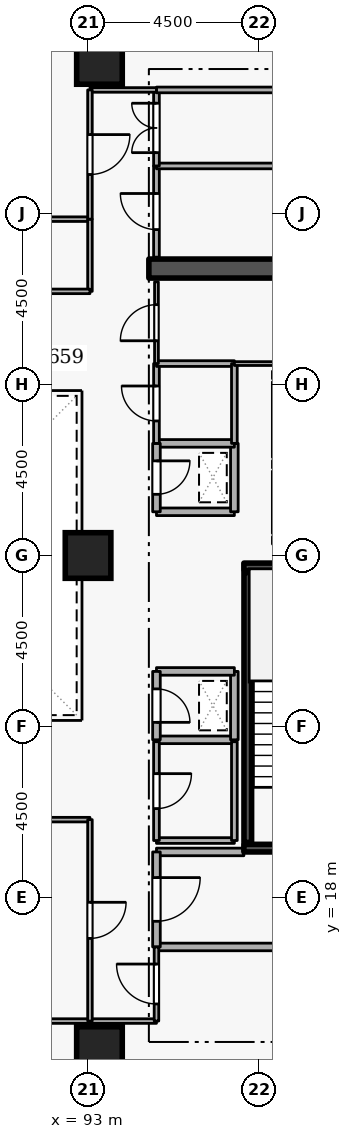
"""IFC4 building model, lengths in metres.
Left out: names, types, materials, properties, quantities, classifications, styles, units other than length and angle.
Written with IfcOpenShell. Run it as: python <this file> out.ifc"""

import sys

from ifc_helpers import new_model, si_unit, direction, frame, frame_2d, origin, origin_2d, place, context, subcontext, project, spatial, rectangle, extrude, element, fill, save


model = new_model("IFC4")
c1 = context("Model", 3, precision=1e-05, world=origin(), true_north=direction((0.0, 1.0)))
c2 = subcontext(c1, "Body", "Model", "MODEL_VIEW")
j1 = project(units=[si_unit("LENGTHUNIT", "METRE"), si_unit("PLANEANGLEUNIT", "RADIAN")], contexts=[c1])
p1 = place(None, origin())
s1 = spatial("IfcSite", under=j1, at=p1, CompositionType="ELEMENT")
p2 = place(p1, origin())
s2 = spatial("IfcBuilding", under=s1, at=p2, CompositionType="ELEMENT")
p3 = place(p2, frame((0.0, 0.0, 137.7)))
s3 = spatial("IfcBuildingStorey", under=s2, at=p3, CompositionType="ELEMENT", Elevation=137.7)
p4 = place(p3, frame((94.6, 34.55, 0.0), z_axis=(0.0, 0.0, 1.0), x_axis=(1.0, 0.0, 0.0)))
e1 = element("IfcWall", 1, at=p4, inside=s3, PredefinedType="SHEAR", context=c2, shape_type="SweptSolid", body=[
    extrude(rectangle(XDim=5.8, YDim=0.5, at=frame_2d((2.9, 0.0))), origin(), (0.0, 0.0, 1.0), 3.6),
])
for number, where, z_axis, x_axis in (
    (2, (93.3, 14.0, 0.0), (0.0, 0.0, 1.0), (1.0, 0.0, 0.0)),
    (3, (93.3, 40.0, 0.0), (0.0, 0.0, 1.0), (1.0, 0.0, 0.0)),
    (4, (93.0, 27.0, 0.0), (0.0, 0.0, 1.0), (1.0, 0.0, 0.0)),
):
    element("IfcColumn", number, at=place(p3, frame(where, z_axis=z_axis, x_axis=x_axis)), inside=s3, PredefinedType="COLUMN", context=c2, shape_type="SweptSolid", body=[
        extrude(rectangle(XDim=1.2, YDim=1.2, at=origin_2d()), origin(), (0.0, 0.0, 1.0), 3.6),
    ])
p5 = place(p3, frame((97.95, 29.22, 0.0), z_axis=(0.0, 0.0, 1.0), x_axis=(0.0, -1.0, 0.0)))
e5 = element("IfcWall", 5, at=p5, inside=s3, PredefinedType="STANDARD", context=c2, shape_type="SweptSolid", body=[
    extrude(rectangle(XDim=1.64, YDim=0.2, at=frame_2d((0.82, 0.0))), origin(), (0.0, 0.0, 1.0), 3.26),
])
p6 = place(p5, frame((0.31, 0.0, 0.0)))
e6 = element("IfcOpeningElement", 6, at=p6, cuts=e5, PredefinedType="OPENING", context=c2, shape_type="SweptSolid", body=[
    extrude(rectangle(XDim=1.02, YDim=2.06, at=frame_2d((0.51, 1.03))), frame((0.0, 0.11, 0.0), z_axis=(0.0, -1.0, 0.0), x_axis=(1.0, 0.0, 0.0)), (0.0, 0.0, 1.0), 0.22),
])
p7 = place(p3, frame((97.95, 31.57, 0.0), z_axis=(0.0, 0.0, 1.0), x_axis=(0.0, -1.0, 0.0)))
e7 = element("IfcWall", 7, at=p7, inside=s3, PredefinedType="STANDARD", context=c2, shape_type="SweptSolid", body=[
    extrude(rectangle(XDim=1.99, YDim=0.2, at=frame_2d((0.995, 0.0))), origin(), (0.0, 0.0, 1.0), 3.26),
])
p8 = place(p3, frame((100.45, 19.3, 0.0), z_axis=(0.0, 0.0, 1.0), x_axis=(-1.0, 0.0, 0.0)))
e8 = element("IfcWall", 8, at=p8, inside=s3, PredefinedType="SHEAR", context=c2, shape_type="SweptSolid", body=[
    extrude(rectangle(XDim=3.35, YDim=0.2, at=frame_2d((1.675, 0.0))), origin(), (0.0, 0.0, 1.0), 3.6),
])
p9 = place(p8, frame((1.125, 0.0, 0.0)))
e9 = element("IfcOpeningElement", 9, at=p9, cuts=e8, PredefinedType="OPENING", context=c2, shape_type="SweptSolid", body=[
    extrude(rectangle(XDim=1.1, YDim=2.1, at=frame_2d((0.55, 1.05))), frame((0.0, 0.11, 0.0), z_axis=(0.0, -1.0, 0.0), x_axis=(1.0, 0.0, 0.0)), (0.0, 0.0, 1.0), 0.22),
])
p10 = place(p3, frame((97.1, 26.7, 0.0), z_axis=(0.0, 0.0, 1.0), x_axis=(1.0, 0.0, 0.0)))
e10 = element("IfcWall", 10, at=p10, inside=s3, PredefinedType="SHEAR", context=c2, shape_type="SweptSolid", body=[
    extrude(rectangle(XDim=3.35, YDim=0.2, at=frame_2d((1.675, 0.0))), origin(), (0.0, 0.0, 1.0), 3.6),
])
p11 = place(p3, frame((97.203, 26.55, 0.0), z_axis=(0.0, 0.0, 1.0), x_axis=(0.0, -1.0, 0.0)))
e11 = element("IfcWall", 11, at=p11, inside=s3, PredefinedType="SHEAR", context=c2, shape_type="SweptSolid", body=[
    extrude(rectangle(XDim=7.1, YDim=0.2, at=frame_2d((3.55, 0.0))), origin(), (0.0, 0.0, 1.0), 3.6),
])
p12 = place(p3, frame((94.8, 16.7, 0.0), z_axis=(0.0, 0.0, 1.0), x_axis=(1.0, 0.0, 0.0)))
e12 = element("IfcWall", 12, at=p12, inside=s3, PredefinedType="STANDARD", context=c2, shape_type="SweptSolid", body=[
    extrude(rectangle(XDim=5.7, YDim=0.2, at=frame_2d((2.85, 0.0))), origin(), (0.0, 0.0, 1.0), 3.26),
])
p13 = place(p3, frame((97.1, 19.2, 0.0), z_axis=(0.0, 0.0, 1.0), x_axis=(-1.0, 0.0, 0.0)))
e13 = element("IfcWall", 13, at=p13, inside=s3, PredefinedType="STANDARD", context=c2, shape_type="SweptSolid", body=[
    extrude(rectangle(XDim=2.3, YDim=0.2, at=frame_2d((1.15, 0.0))), origin(), (0.0, 0.0, 1.0), 2.465),
])
p14 = place(p3, frame((94.8, 19.2, 0.0), z_axis=(0.0, 0.0, 1.0), x_axis=(0.0, -1.0, 0.0)))
e14 = element("IfcWall", 14, at=p14, inside=s3, PredefinedType="STANDARD", context=c2, shape_type="SweptSolid", body=[
    extrude(rectangle(XDim=2.5, YDim=0.2, at=frame_2d((1.25, 0.0))), origin(), (0.0, 0.0, 1.0), 3.26),
])
p15 = place(p14, frame((0.675, 0.0, 0.0)))
e15 = element("IfcOpeningElement", 15, at=p15, cuts=e14, PredefinedType="OPENING", context=c2, shape_type="SweptSolid", body=[
    extrude(rectangle(XDim=1.15, YDim=2.1, at=frame_2d((0.575, 1.05))), frame((0.0, 0.11, 0.0), z_axis=(0.0, -1.0, 0.0), x_axis=(1.0, 0.0, 0.0)), (0.0, 0.0, 1.0), 0.22),
])
p16 = place(p3, frame((94.8, 28.15, 0.0), z_axis=(0.0, 0.0, 1.0), x_axis=(1.0, 0.0, 0.0)))
e16 = element("IfcWall", 16, at=p16, inside=s3, PredefinedType="STANDARD", context=c2, shape_type="SweptSolid", body=[
    extrude(rectangle(XDim=2.05, YDim=0.2, at=frame_2d((1.025, 0.0))), origin(), (0.0, 0.0, 1.0), 3.26),
])
p17 = place(p3, frame((96.85, 28.15, 0.0), z_axis=(0.0, 0.0, 1.0), x_axis=(0.0, 1.0, 0.0)))
e17 = element("IfcWall", 17, at=p17, inside=s3, PredefinedType="STANDARD", context=c2, shape_type="SweptSolid", body=[
    extrude(rectangle(XDim=1.8, YDim=0.2, at=frame_2d((0.9, 0.0))), origin(), (0.0, 0.0, 1.0), 3.26),
])
p18 = place(p3, frame((96.85, 29.95, 0.0), z_axis=(0.0, 0.0, 1.0), x_axis=(-1.0, 0.0, 0.0)))
e18 = element("IfcWall", 18, at=p18, inside=s3, PredefinedType="STANDARD", context=c2, shape_type="SweptSolid", body=[
    extrude(rectangle(XDim=2.05, YDim=0.2, at=frame_2d((1.025, 0.0))), origin(), (0.0, 0.0, 1.0), 3.26),
])
p19 = place(p3, frame((94.8, 29.95, 0.0), z_axis=(0.0, 0.0, 1.0), x_axis=(0.0, -1.0, 0.0)))
e19 = element("IfcWall", 19, at=p19, inside=s3, PredefinedType="STANDARD", context=c2, shape_type="SweptSolid", body=[
    extrude(rectangle(XDim=1.8, YDim=0.2, at=frame_2d((0.9, 0.0))), origin(), (0.0, 0.0, 1.0), 3.26),
])
p20 = place(p19, frame((0.46, 0.0, 0.0)))
e20 = element("IfcOpeningElement", 20, at=p20, cuts=e19, PredefinedType="OPENING", context=c2, shape_type="SweptSolid", body=[
    extrude(rectangle(XDim=0.88, YDim=2.04, at=frame_2d((0.44, 1.02))), frame((0.0, 0.11, 0.0), z_axis=(0.0, -1.0, 0.0), x_axis=(1.0, 0.0, 0.0)), (0.0, 0.0, 1.0), 0.22),
])
p21 = place(p3, frame((94.8, 22.15, 0.0), z_axis=(0.0, 0.0, 1.0), x_axis=(1.0, 0.0, 0.0)))
e21 = element("IfcWall", 21, at=p21, inside=s3, PredefinedType="STANDARD", context=c2, shape_type="SweptSolid", body=[
    extrude(rectangle(XDim=2.05, YDim=0.2, at=frame_2d((1.025, 0.0))), origin(), (0.0, 0.0, 1.0), 3.26),
])
p22 = place(p3, frame((96.85, 22.15, 0.0), z_axis=(0.0, 0.0, 1.0), x_axis=(0.0, 1.0, 0.0)))
e22 = element("IfcWall", 22, at=p22, inside=s3, PredefinedType="STANDARD", context=c2, shape_type="SweptSolid", body=[
    extrude(rectangle(XDim=1.8, YDim=0.2, at=frame_2d((0.9, 0.0))), origin(), (0.0, 0.0, 1.0), 3.26),
])
p23 = place(p3, frame((96.85, 23.95, 0.0), z_axis=(0.0, 0.0, 1.0), x_axis=(-1.0, 0.0, 0.0)))
e23 = element("IfcWall", 23, at=p23, inside=s3, PredefinedType="STANDARD", context=c2, shape_type="SweptSolid", body=[
    extrude(rectangle(XDim=2.05, YDim=0.2, at=frame_2d((1.025, 0.0))), origin(), (0.0, 0.0, 1.0), 3.26),
])
p24 = place(p3, frame((94.8, 23.95, 0.0), z_axis=(0.0, 0.0, 1.0), x_axis=(0.0, -1.0, 0.0)))
e24 = element("IfcWall", 24, at=p24, inside=s3, PredefinedType="STANDARD", context=c2, shape_type="SweptSolid", body=[
    extrude(rectangle(XDim=1.8, YDim=0.2, at=frame_2d((0.9, 0.0))), origin(), (0.0, 0.0, 1.0), 3.26),
])
p25 = place(p24, frame((0.46, 0.0, 0.0)))
e25 = element("IfcOpeningElement", 25, at=p25, cuts=e24, PredefinedType="OPENING", context=c2, shape_type="SweptSolid", body=[
    extrude(rectangle(XDim=0.88, YDim=2.04, at=frame_2d((0.44, 1.02))), frame((0.0, 0.11, 0.0), z_axis=(0.0, -1.0, 0.0), x_axis=(1.0, 0.0, 0.0)), (0.0, 0.0, 1.0), 0.22),
])
p26 = place(p3, frame((94.8, 19.5, 0.0), z_axis=(0.0, 0.0, 1.0), x_axis=(1.0, 0.0, 0.0)))
e26 = element("IfcWall", 26, at=p26, inside=s3, PredefinedType="PARTITIONING", context=c2, shape_type="SweptSolid", body=[
    extrude(rectangle(XDim=2.05, YDim=0.15, at=frame_2d((1.025, 0.0))), origin(), (0.0, 0.0, 1.0), 2.465),
])
p27 = place(p3, frame((96.85, 19.5, 0.0), z_axis=(0.0, 0.0, 1.0), x_axis=(0.0, 1.0, 0.0)))
e27 = element("IfcWall", 27, at=p27, inside=s3, PredefinedType="PARTITIONING", context=c2, shape_type="SweptSolid", body=[
    extrude(rectangle(XDim=2.6, YDim=0.15, at=frame_2d((1.3, 0.0))), origin(), (0.0, 0.0, 1.0), 3.26),
])
p28 = place(p3, frame((94.8, 22.1, 0.0), z_axis=(0.0, 0.0, 1.0), x_axis=(0.0, -1.0, 0.0)))
e28 = element("IfcWall", 28, at=p28, inside=s3, PredefinedType="PARTITIONING", context=c2, shape_type="SweptSolid", body=[
    extrude(rectangle(XDim=2.6, YDim=0.15, at=frame_2d((1.3, 0.0))), origin(), (0.0, 0.0, 1.0), 3.26),
])
p29 = place(p28, frame((0.84, 0.0, 0.0)))
e29 = element("IfcOpeningElement", 29, at=p29, cuts=e28, PredefinedType="OPENING", context=c2, shape_type="SweptSolid", body=[
    extrude(rectangle(XDim=0.92, YDim=2.08, at=frame_2d((0.46, 1.04))), frame((0.0, 0.085, 0.0), z_axis=(0.0, -1.0, 0.0), x_axis=(1.0, 0.0, 0.0)), (0.0, 0.0, 1.0), 0.17),
])
p30 = place(p3, frame((94.8, 29.95, 0.0), z_axis=(0.0, 0.0, 1.0), x_axis=(0.0, 1.0, 0.0)))
e30 = element("IfcWall", 30, at=p30, inside=s3, PredefinedType="PARTITIONING", context=c2, shape_type="SweptSolid", body=[
    extrude(rectangle(XDim=2.1, YDim=0.15, at=frame_2d((1.05, 0.0))), origin(), (0.0, 0.0, 1.0), 3.26),
])
p31 = place(p30, frame((0.59, 0.0, 0.0)))
e31 = element("IfcOpeningElement", 31, at=p31, cuts=e30, PredefinedType="OPENING", context=c2, shape_type="SweptSolid", body=[
    extrude(rectangle(XDim=0.92, YDim=2.08, at=frame_2d((0.46, 1.04))), frame((0.0, 0.085, 0.0), z_axis=(0.0, -1.0, 0.0), x_axis=(1.0, 0.0, 0.0)), (0.0, 0.0, 1.0), 0.17),
])
p32 = place(p3, frame((94.8, 32.05, 0.0), z_axis=(0.0, 0.0, 1.0), x_axis=(1.0, 0.0, 0.0)))
e32 = element("IfcWall", 32, at=p32, inside=s3, PredefinedType="PARTITIONING", context=c2, shape_type="SweptSolid", body=[
    extrude(rectangle(XDim=2.05, YDim=0.15, at=frame_2d((1.025, 0.0))), origin(), (0.0, 0.0, 1.0), 3.26),
])
p33 = place(p3, frame((96.85, 32.05, 0.0), z_axis=(0.0, 0.0, 1.0), x_axis=(0.0, -1.0, 0.0)))
e33 = element("IfcWall", 33, at=p33, inside=s3, PredefinedType="PARTITIONING", context=c2, shape_type="SweptSolid", body=[
    extrude(rectangle(XDim=2.1, YDim=0.15, at=frame_2d((1.05, 0.0))), origin(), (0.0, 0.0, 1.0), 3.26),
])
p34 = place(p3, frame((94.8, 32.05, 0.0), z_axis=(0.0, 0.0, 1.0), x_axis=(0.0, 1.0, 0.0)))
e34 = element("IfcWall", 34, at=p34, inside=s3, PredefinedType="PARTITIONING", context=c2, shape_type="SweptSolid", body=[
    extrude(rectangle(XDim=2.15, YDim=0.1, at=frame_2d((1.075, 0.0))), origin(), (0.0, 0.0, 1.0), 3.26),
])
p35 = place(p34, frame((0.6, 0.0, 0.0)))
e35 = element("IfcOpeningElement", 35, at=p35, cuts=e34, PredefinedType="OPENING", context=c2, shape_type="SweptSolid", body=[
    extrude(rectangle(XDim=0.95, YDim=2.1, at=frame_2d((0.475, 1.05))), frame((0.0, 0.06, 0.0), z_axis=(0.0, -1.0, 0.0), x_axis=(1.0, 0.0, 0.0)), (0.0, 0.0, 1.0), 0.12),
])
p36 = place(p3, frame((100.4, 32.05, 0.0), z_axis=(0.0, 0.0, 1.0), x_axis=(-1.0, 0.0, 0.0)))
e36 = element("IfcWall", 36, at=p36, inside=s3, PredefinedType="PARTITIONING", context=c2, shape_type="SweptSolid", body=[
    extrude(rectangle(XDim=3.55, YDim=0.1, at=frame_2d((1.775, 0.0))), origin(), (0.0, 0.0, 1.0), 3.26),
])
p37 = place(p3, frame((94.8, 34.85, 0.0), z_axis=(0.0, 0.0, 1.0), x_axis=(0.0, 1.0, 0.0)))
e37 = element("IfcWall", 37, at=p37, inside=s3, PredefinedType="PARTITIONING", context=c2, shape_type="SweptSolid", body=[
    extrude(rectangle(XDim=2.4, YDim=0.15, at=frame_2d((1.2, 0.0))), origin(), (0.0, 0.0, 1.0), 3.26),
])
p38 = place(p37, frame((0.725, 0.0, 0.0)))
e38 = element("IfcOpeningElement", 38, at=p38, cuts=e37, PredefinedType="OPENING", context=c2, shape_type="SweptSolid", body=[
    extrude(rectangle(XDim=0.95, YDim=2.1, at=frame_2d((0.475, 1.05))), frame((0.0, 0.085, 0.0), z_axis=(0.0, -1.0, 0.0), x_axis=(1.0, 0.0, 0.0)), (0.0, 0.0, 1.0), 0.17),
])
p39 = place(p3, frame((94.8, 37.25, 0.0), z_axis=(0.0, 0.0, 1.0), x_axis=(1.0, 0.0, 0.0)))
e39 = element("IfcWall", 39, at=p39, inside=s3, PredefinedType="PARTITIONING", context=c2, shape_type="SweptSolid", body=[
    extrude(rectangle(XDim=5.65, YDim=0.15, at=frame_2d((2.825, 0.0))), origin(), (0.0, 0.0, 1.0), 3.26),
])
p40 = place(p3, frame((94.8, 37.25, 0.0), z_axis=(0.0, 0.0, 1.0), x_axis=(0.0, 1.0, 0.0)))
e40 = element("IfcWall", 40, at=p40, inside=s3, PredefinedType="PARTITIONING", context=c2, shape_type="SweptSolid", body=[
    extrude(rectangle(XDim=2.0, YDim=0.15, at=frame_2d((1.0, 0.0))), origin(), (0.0, 0.0, 1.0), 3.26),
])
p41 = place(p40, frame((0.35, 0.0, 0.0)))
e41 = element("IfcOpeningElement", 41, at=p41, cuts=e40, PredefinedType="OPENING", context=c2, shape_type="SweptSolid", body=[
    extrude(rectangle(XDim=1.3, YDim=2.12, at=frame_2d((0.65, 1.06))), frame((0.0, 0.085, 0.0), z_axis=(0.0, -1.0, 0.0), x_axis=(1.0, 0.0, 0.0)), (0.0, 0.0, 1.0), 0.17),
])
p42 = place(p3, frame((94.8, 39.25, 0.0), z_axis=(0.0, 0.0, 1.0), x_axis=(1.0, 0.0, 0.0)))
e42 = element("IfcWall", 42, at=p42, inside=s3, PredefinedType="PARTITIONING", context=c2, shape_type="SweptSolid", body=[
    extrude(rectangle(XDim=5.65, YDim=0.15, at=frame_2d((2.825, 0.0))), origin(), (0.0, 0.0, 1.0), 3.26),
])
p43 = place(p3, frame((88.5, 14.75, 0.0), z_axis=(0.0, 0.0, 1.0), x_axis=(1.0, 0.0, 0.0)))
e43 = element("IfcWall", 43, at=p43, inside=s3, PredefinedType="PARTITIONING", context=c2, shape_type="SweptSolid", body=[
    extrude(rectangle(XDim=4.55, YDim=0.12, at=frame_2d((2.275, 0.0))), origin(), (0.0, 0.0, 1.0), 3.26),
])
p44 = place(p3, frame((93.05, 14.75, 0.0), z_axis=(0.0, 0.0, 1.0), x_axis=(1.0, 0.0, 0.0)))
e44 = element("IfcWall", 44, at=p44, inside=s3, PredefinedType="PARTITIONING", context=c2, shape_type="SweptSolid", body=[
    extrude(rectangle(XDim=1.75, YDim=0.12, at=frame_2d((0.875, 0.0))), origin(), (0.0, 0.0, 1.0), 3.26),
])
p45 = place(p3, frame((94.8, 14.75, 0.0), z_axis=(0.0, 0.0, 1.0), x_axis=(0.0, 1.0, 0.0)))
e45 = element("IfcWall", 45, at=p45, inside=s3, PredefinedType="PARTITIONING", context=c2, shape_type="SweptSolid", body=[
    extrude(rectangle(XDim=1.95, YDim=0.12, at=frame_2d((0.975, 0.0))), origin(), (0.0, 0.0, 1.0), 3.26),
])
p46 = place(p45, frame((0.45, 0.0, 0.0)))
e46 = element("IfcOpeningElement", 46, at=p46, cuts=e45, PredefinedType="OPENING", context=c2, shape_type="SweptSolid", body=[
    extrude(rectangle(XDim=1.05, YDim=2.1, at=frame_2d((0.525, 1.05))), frame((0.0, 0.07, 0.0), z_axis=(0.0, -1.0, 0.0), x_axis=(1.0, 0.0, 0.0)), (0.0, 0.0, 1.0), 0.14),
])
p47 = place(p3, frame((88.5, 20.05, 0.0), z_axis=(0.0, 0.0, 1.0), x_axis=(1.0, 0.0, 0.0)))
e47 = element("IfcWall", 47, at=p47, inside=s3, PredefinedType="PARTITIONING", context=c2, shape_type="SweptSolid", body=[
    extrude(rectangle(XDim=4.55, YDim=0.12, at=frame_2d((2.275, 0.0))), origin(), (0.0, 0.0, 1.0), 3.26),
])
p48 = place(p3, frame((93.05, 20.05, 0.0), z_axis=(0.0, 0.0, 1.0), x_axis=(0.0, -1.0, 0.0)))
e48 = element("IfcWall", 48, at=p48, inside=s3, PredefinedType="PARTITIONING", context=c2, shape_type="SweptSolid", body=[
    extrude(rectangle(XDim=5.3, YDim=0.12, at=frame_2d((2.65, 0.0))), origin(), (0.0, 0.0, 1.0), 3.26),
])
p49 = place(p48, frame((2.175, 0.0, 0.0)))
e49 = element("IfcOpeningElement", 49, at=p49, cuts=e48, PredefinedType="OPENING", context=c2, shape_type="SweptSolid", body=[
    extrude(rectangle(XDim=0.95, YDim=2.1, at=frame_2d((0.475, 1.05))), frame((0.0, 0.07, 0.0), z_axis=(0.0, -1.0, 0.0), x_axis=(1.0, 0.0, 0.0)), (0.0, 0.0, 1.0), 0.14),
])
p50 = place(p3, frame((88.5, 35.85, 0.0), z_axis=(0.0, 0.0, 1.0), x_axis=(1.0, 0.0, 0.0)))
e50 = element("IfcWall", 50, at=p50, inside=s3, PredefinedType="PARTITIONING", context=c2, shape_type="SweptSolid", body=[
    extrude(rectangle(XDim=4.55, YDim=0.12, at=frame_2d((2.275, 0.0))), origin(), (0.0, 0.0, 1.0), 3.26),
])
p51 = place(p3, frame((93.05, 35.85, 0.0), z_axis=(0.0, 0.0, 1.0), x_axis=(0.0, -1.0, 0.0)))
e51 = element("IfcWall", 51, at=p51, inside=s3, PredefinedType="PARTITIONING", context=c2, shape_type="SweptSolid", body=[
    extrude(rectangle(XDim=1.9, YDim=0.12, at=frame_2d((0.95, 0.0))), origin(), (0.0, 0.0, 1.0), 3.26),
])
p52 = place(p3, frame((93.05, 33.95, 0.0), z_axis=(0.0, 0.0, 1.0), x_axis=(-1.0, 0.0, 0.0)))
e52 = element("IfcWall", 52, at=p52, inside=s3, PredefinedType="PARTITIONING", context=c2, shape_type="SweptSolid", body=[
    extrude(rectangle(XDim=4.55, YDim=0.12, at=frame_2d((2.275, 0.0))), origin(), (0.0, 0.0, 1.0), 3.26),
])
p53 = place(p52, frame((1.8, 0.0, 0.0)))
e53 = element("IfcOpeningElement", 53, at=p53, cuts=e52, PredefinedType="OPENING", context=c2, shape_type="SweptSolid", body=[
    extrude(rectangle(XDim=0.95, YDim=2.1, at=frame_2d((0.475, 1.05))), frame((0.0, 0.07, 0.0), z_axis=(0.0, -1.0, 0.0), x_axis=(1.0, 0.0, 0.0)), (0.0, 0.0, 1.0), 0.14),
])
p54 = place(p3, frame((94.8, 39.25, 0.0), z_axis=(0.0, 0.0, 1.0), x_axis=(-1.0, 0.0, 0.0)))
e54 = element("IfcWall", 54, at=p54, inside=s3, PredefinedType="PARTITIONING", context=c2, shape_type="SweptSolid", body=[
    extrude(rectangle(XDim=1.75, YDim=0.12, at=frame_2d((0.875, 0.0))), origin(), (0.0, 0.0, 1.0), 3.26),
])
p55 = place(p3, frame((93.05, 39.25, 0.0), z_axis=(0.0, 0.0, 1.0), x_axis=(0.0, -1.0, 0.0)))
e55 = element("IfcWall", 55, at=p55, inside=s3, PredefinedType="PARTITIONING", context=c2, shape_type="SweptSolid", body=[
    extrude(rectangle(XDim=3.4, YDim=0.12, at=frame_2d((1.7, 0.0))), origin(), (0.0, 0.0, 1.0), 3.26),
])
p56 = place(p55, frame((1.175, 0.0, 0.0)))
e56 = element("IfcOpeningElement", 56, at=p56, cuts=e55, PredefinedType="OPENING", context=c2, shape_type="SweptSolid", body=[
    extrude(rectangle(XDim=1.05, YDim=2.1, at=frame_2d((0.525, 1.05))), frame((0.0, 0.07, 0.0), z_axis=(0.0, -1.0, 0.0), x_axis=(1.0, 0.0, 0.0)), (0.0, 0.0, 1.0), 0.14),
])
p57 = place(p15, origin())
e57 = element("IfcDoor", 57, at=p57, inside=s3, OperationType="SINGLE_SWING_LEFT", PredefinedType="DOOR", context=c2, shape_type="SweptSolid", body=[
    extrude(rectangle(XDim=1.15, YDim=2.1, at=frame_2d((0.575, 1.05))), frame((0.0, 0.025, 0.0), z_axis=(0.0, -1.0, 0.0), x_axis=(1.0, 0.0, 0.0)), (0.0, 0.0, 1.0), 0.05),
])
fill(e15, e57)
p58 = place(p20, origin())
e58 = element("IfcDoor", 58, at=p58, inside=s3, OperationType="SINGLE_SWING_LEFT", PredefinedType="DOOR", context=c2, shape_type="SweptSolid", body=[
    extrude(rectangle(XDim=0.88, YDim=2.04, at=frame_2d((0.44, 1.02))), frame((0.0, 0.025, 0.0), z_axis=(0.0, -1.0, 0.0), x_axis=(1.0, 0.0, 0.0)), (0.0, 0.0, 1.0), 0.05),
])
fill(e20, e58)
p59 = place(p25, origin())
e59 = element("IfcDoor", 59, at=p59, inside=s3, OperationType="SINGLE_SWING_RIGHT", PredefinedType="DOOR", context=c2, shape_type="SweptSolid", body=[
    extrude(rectangle(XDim=0.88, YDim=2.04, at=frame_2d((0.44, 1.02))), frame((0.0, 0.025, 0.0), z_axis=(0.0, -1.0, 0.0), x_axis=(1.0, 0.0, 0.0)), (0.0, 0.0, 1.0), 0.05),
])
fill(e25, e59)
p60 = place(p29, origin())
e60 = element("IfcDoor", 60, at=p60, inside=s3, OperationType="SINGLE_SWING_LEFT", PredefinedType="DOOR", context=c2, shape_type="SweptSolid", body=[
    extrude(rectangle(XDim=0.92, YDim=2.08, at=frame_2d((0.46, 1.04))), frame((0.0, 0.025, 0.0), z_axis=(0.0, -1.0, 0.0), x_axis=(1.0, 0.0, 0.0)), (0.0, 0.0, 1.0), 0.05),
])
fill(e29, e60)
p61 = place(p31, origin())
e61 = element("IfcDoor", 61, at=p61, inside=s3, OperationType="SINGLE_SWING_RIGHT", PredefinedType="DOOR", context=c2, shape_type="SweptSolid", body=[
    extrude(rectangle(XDim=0.92, YDim=2.08, at=frame_2d((0.46, 1.04))), frame((0.0, 0.025, 0.0), z_axis=(0.0, -1.0, 0.0), x_axis=(1.0, 0.0, 0.0)), (0.0, 0.0, 1.0), 0.05),
])
fill(e31, e61)
p62 = place(p35, origin())
e62 = element("IfcDoor", 62, at=p62, inside=s3, OperationType="SINGLE_SWING_LEFT", PredefinedType="DOOR", context=c2, shape_type="SweptSolid", body=[
    extrude(rectangle(XDim=0.95, YDim=2.1, at=frame_2d((0.475, 1.05))), frame((0.0, 0.025, 0.0), z_axis=(0.0, -1.0, 0.0), x_axis=(1.0, 0.0, 0.0)), (0.0, 0.0, 1.0), 0.05),
])
fill(e35, e62)
p63 = place(p38, origin())
e63 = element("IfcDoor", 63, at=p63, inside=s3, OperationType="SINGLE_SWING_RIGHT", PredefinedType="DOOR", context=c2, shape_type="SweptSolid", body=[
    extrude(rectangle(XDim=0.95, YDim=2.1, at=frame_2d((0.475, 1.05))), frame((0.0, 0.025, 0.0), z_axis=(0.0, -1.0, 0.0), x_axis=(1.0, 0.0, 0.0)), (0.0, 0.0, 1.0), 0.05),
])
fill(e38, e63)
p64 = place(p41, origin())
e64 = element("IfcDoor", 64, at=p64, inside=s3, OperationType="DOUBLE_DOOR_SINGLE_SWING", PredefinedType="DOOR", context=c2, shape_type="SweptSolid", body=[
    extrude(rectangle(XDim=1.3, YDim=2.12, at=frame_2d((0.65, 1.06))), frame((0.0, 0.025, 0.0), z_axis=(0.0, -1.0, 0.0), x_axis=(1.0, 0.0, 0.0)), (0.0, 0.0, 1.0), 0.05),
])
fill(e41, e64)
p65 = place(p46, origin())
e65 = element("IfcDoor", 65, at=p65, inside=s3, OperationType="SINGLE_SWING_RIGHT", PredefinedType="DOOR", context=c2, shape_type="SweptSolid", body=[
    extrude(rectangle(XDim=1.05, YDim=2.1, at=frame_2d((0.525, 1.05))), frame((0.0, 0.025, 0.0), z_axis=(0.0, -1.0, 0.0), x_axis=(1.0, 0.0, 0.0)), (0.0, 0.0, 1.0), 0.05),
])
fill(e46, e65)
p66 = place(p49, origin())
e66 = element("IfcDoor", 66, at=p66, inside=s3, OperationType="SINGLE_SWING_LEFT", PredefinedType="DOOR", context=c2, shape_type="SweptSolid", body=[
    extrude(rectangle(XDim=0.95, YDim=2.1, at=frame_2d((0.475, 1.05))), frame((0.0, 0.025, 0.0), z_axis=(0.0, -1.0, 0.0), x_axis=(1.0, 0.0, 0.0)), (0.0, 0.0, 1.0), 0.05),
])
fill(e49, e66)
p67 = place(p56, origin())
e67 = element("IfcDoor", 67, at=p67, inside=s3, OperationType="SINGLE_SWING_LEFT", PredefinedType="DOOR", context=c2, shape_type="SweptSolid", body=[
    extrude(rectangle(XDim=1.05, YDim=2.1, at=frame_2d((0.525, 1.05))), frame((0.0, 0.025, 0.0), z_axis=(0.0, -1.0, 0.0), x_axis=(1.0, 0.0, 0.0)), (0.0, 0.0, 1.0), 0.05),
])
fill(e56, e67)
save(model, sys.argv[1])
